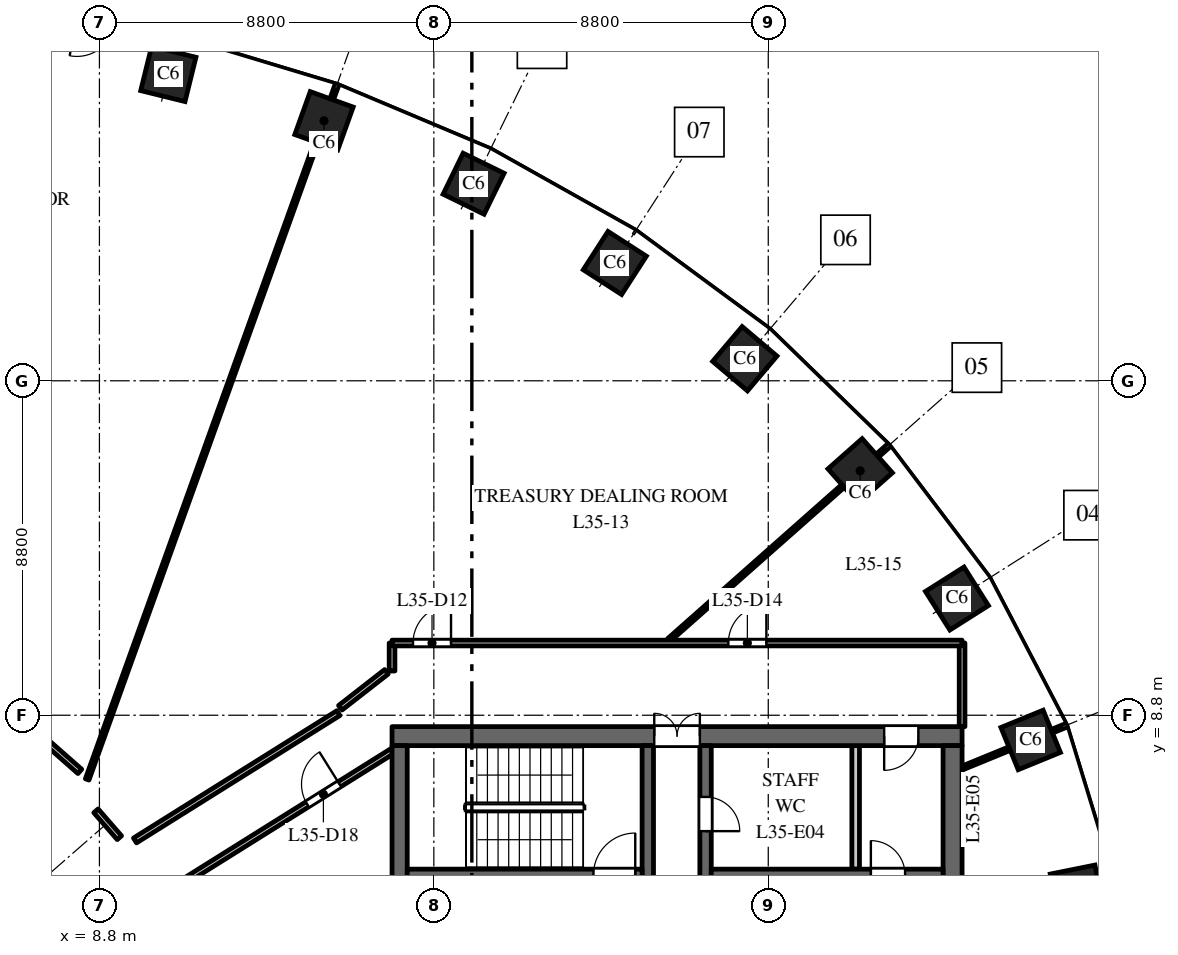
"""IFC4 building model, lengths in metres.
Left out: names, types, materials, properties, quantities, classifications, styles, units other than length and angle.
Written with IfcOpenShell. Run it as: python <this file> out.ifc"""

import sys

from ifc_helpers import new_model, si_unit, direction, frame, frame_2d, origin, origin_2d, place, context, subcontext, project, spatial, rectangle, extrude, element, fill, save


model = new_model("IFC4")
c1 = context("Model", 3, precision=1e-05, world=origin(), true_north=direction((0.0, 1.0)))
c2 = subcontext(c1, "Body", "Model", "MODEL_VIEW")
j1 = project(units=[si_unit("LENGTHUNIT", "METRE"), si_unit("PLANEANGLEUNIT", "RADIAN")], contexts=[c1])
p1 = place(None, origin())
s1 = spatial("IfcSite", under=j1, at=p1, CompositionType="ELEMENT")
p2 = place(p1, origin())
s2 = spatial("IfcBuilding", under=s1, at=p2, CompositionType="ELEMENT")
p3 = place(p2, frame((0.0, 0.0, 154.0)))
s3 = spatial("IfcBuildingStorey", under=s2, at=p3, CompositionType="ELEMENT", Elevation=154.0)
for number, where, z_axis, x_axis in (
    (1, (34.527, 4.151, 0.0), (0.0, 0.0, 1.0), (-0.197, 0.98, 0.0)),
    (2, (33.305, 8.149, 0.0), (0.0, 0.0, 1.0), (-0.379, 0.925, 0.0)),
    (3, (31.365, 11.871, 0.0), (0.0, 0.0, 1.0), (-0.535, 0.845, 0.0)),
    (4, (28.819, 15.23, 0.0), (0.0, 0.0, 1.0), (-0.663, 0.749, 0.0)),
    (5, (25.783, 18.18, 0.0), (0.0, 0.0, 1.0), (-0.763, 0.646, 0.0)),
    (6, (22.362, 20.7, 0.0), (0.0, 0.0, 1.0), (-0.84, 0.542, 0.0)),
    (7, (18.646, 22.785, 0.0), (0.0, 0.0, 1.0), (-0.898, 0.439, 0.0)),
    (8, (14.709, 24.441, 0.0), (0.0, 0.0, 1.0), (-0.941, 0.338, 0.0)),
    (9, (10.613, 25.674, 0.0), (0.0, 0.0, 1.0), (-0.971, 0.24, 0.0)),
):
    element("IfcColumn", number, at=place(p3, frame(where, z_axis=z_axis, x_axis=x_axis)), inside=s3, PredefinedType="COLUMN", context=c2, shape_type="SweptSolid", body=[
        extrude(rectangle(XDim=1.2, YDim=1.2, at=origin_2d()), origin(), (0.0, 0.0, 1.0), 4.0),
    ])
p4 = place(p3, frame((16.5, 8.25, 0.0), z_axis=(0.0, 0.0, 1.0), x_axis=(1.0, 0.0, 0.0)))
e10 = element("IfcWall", 10, at=p4, inside=s3, PredefinedType="SHEAR", context=c2, shape_type="SweptSolid", body=[
    extrude(rectangle(XDim=15.0, YDim=0.5, at=frame_2d((7.5, 0.0))), origin(), (0.0, 0.0, 1.0), 3.7),
])
p5 = place(p4, frame((6.9, 0.0, 0.0)))
e11 = element("IfcOpeningElement", 11, at=p5, cuts=e10, PredefinedType="OPENING", context=c2, shape_type="SweptSolid", body=[
    extrude(rectangle(XDim=1.2, YDim=2.1, at=frame_2d((0.6, 1.05))), frame((0.0, 0.26, 0.0), z_axis=(0.0, -1.0, 0.0), x_axis=(1.0, 0.0, 0.0)), (0.0, 0.0, 1.0), 0.52),
])
p6 = place(p4, frame((12.95, 0.0, 0.0)))
e12 = element("IfcOpeningElement", 12, at=p6, cuts=e10, PredefinedType="OPENING", context=c2, shape_type="SweptSolid", body=[
    extrude(rectangle(XDim=0.9, YDim=2.1, at=frame_2d((0.45, 1.05))), frame((0.0, 0.26, 0.0), z_axis=(0.0, -1.0, 0.0), x_axis=(1.0, 0.0, 0.0)), (0.0, 0.0, 1.0), 0.52),
])
p7 = place(p3, frame((24.75, -8.0, 0.0), z_axis=(0.0, 0.0, 1.0), x_axis=(0.0, 1.0, 0.0)))
e13 = element("IfcWall", 13, at=p7, inside=s3, PredefinedType="SHEAR", context=c2, shape_type="SweptSolid", body=[
    extrude(rectangle(XDim=16.0, YDim=0.3, at=frame_2d((8.0, 0.0))), origin(), (0.0, 0.0, 1.0), 3.7),
])
p8 = place(p7, frame((4.425, 0.0, 0.0)))
e14 = element("IfcOpeningElement", 14, at=p8, cuts=e13, PredefinedType="OPENING", context=c2, shape_type="SweptSolid", body=[
    extrude(rectangle(XDim=1.1, YDim=2.1, at=frame_2d((0.55, 1.05))), frame((0.0, 0.16, 0.0), z_axis=(0.0, -1.0, 0.0), x_axis=(1.0, 0.0, 0.0)), (0.0, 0.0, 1.0), 0.32),
])
p9 = place(p7, frame((7.45, 0.0, 0.0)))
e15 = element("IfcOpeningElement", 15, at=p9, cuts=e13, PredefinedType="OPENING", context=c2, shape_type="SweptSolid", body=[
    extrude(rectangle(XDim=1.1, YDim=2.1, at=frame_2d((0.55, 1.05))), frame((0.0, 0.16, 0.0), z_axis=(0.0, -1.0, 0.0), x_axis=(1.0, 0.0, 0.0)), (0.0, 0.0, 1.0), 0.32),
])
p10 = place(p7, frame((10.475, 0.0, 0.0)))
e16 = element("IfcOpeningElement", 16, at=p10, cuts=e13, PredefinedType="OPENING", context=c2, shape_type="SweptSolid", body=[
    extrude(rectangle(XDim=1.1, YDim=2.1, at=frame_2d((0.55, 1.05))), frame((0.0, 0.16, 0.0), z_axis=(0.0, -1.0, 0.0), x_axis=(1.0, 0.0, 0.0)), (0.0, 0.0, 1.0), 0.32),
])
p11 = place(p7, frame((13.75, 0.0, 0.0)))
e17 = element("IfcOpeningElement", 17, at=p11, cuts=e13, PredefinedType="OPENING", context=c2, shape_type="SweptSolid", body=[
    extrude(rectangle(XDim=0.9, YDim=2.1, at=frame_2d((0.45, 1.05))), frame((0.0, 0.16, 0.0), z_axis=(0.0, -1.0, 0.0), x_axis=(1.0, 0.0, 0.0)), (0.0, 0.0, 1.0), 0.32),
])
p12 = place(p7, frame((1.975, 0.0, 0.0)))
e18 = element("IfcOpeningElement", 18, at=p12, cuts=e13, PredefinedType="OPENING", context=c2, shape_type="SweptSolid", body=[
    extrude(rectangle(XDim=0.9, YDim=2.1, at=frame_2d((0.45, 1.05))), frame((0.0, 0.16, 0.0), z_axis=(0.0, -1.0, 0.0), x_axis=(1.0, 0.0, 0.0)), (0.0, 0.0, 1.0), 0.32),
])
p13 = place(p7, frame((0.35, 0.0, 0.0)))
e19 = element("IfcOpeningElement", 19, at=p13, cuts=e13, PredefinedType="OPENING", context=c2, shape_type="SweptSolid", body=[
    extrude(rectangle(XDim=0.9, YDim=2.1, at=frame_2d((0.45, 1.05))), frame((0.0, 0.16, 0.0), z_axis=(0.0, -1.0, 0.0), x_axis=(1.0, 0.0, 0.0)), (0.0, 0.0, 1.0), 0.32),
])
p14 = place(p3, frame((16.7, -8.0, 0.0), z_axis=(0.0, 0.0, 1.0), x_axis=(0.0, 1.0, 0.0)))
e20 = element("IfcWall", 20, at=p14, inside=s3, PredefinedType="SHEAR", context=c2, shape_type="SweptSolid", body=[
    extrude(rectangle(XDim=16.0, YDim=0.4, at=frame_2d((8.0, 0.0))), origin(), (0.0, 0.0, 1.0), 3.7),
])
p15 = place(p3, frame((31.25, -8.0, 0.0), z_axis=(0.0, 0.0, 1.0), x_axis=(0.0, 1.0, 0.0)))
e21 = element("IfcWall", 21, at=p15, inside=s3, PredefinedType="SHEAR", context=c2, shape_type="SweptSolid", body=[
    extrude(rectangle(XDim=16.0, YDim=0.5, at=frame_2d((8.0, 0.0))), origin(), (0.0, 0.0, 1.0), 3.7),
])
p16 = place(p3, frame((24.9, 4.6, 0.0), z_axis=(0.0, 0.0, 1.0), x_axis=(1.0, 0.0, 0.0)))
e22 = element("IfcWall", 22, at=p16, inside=s3, PredefinedType="SHEAR", context=c2, shape_type="SweptSolid", body=[
    extrude(rectangle(XDim=6.1, YDim=0.3, at=frame_2d((3.05, 0.0))), origin(), (0.0, 0.0, 1.0), 3.7),
])
p17 = place(p16, frame((4.2, 0.0, 0.0)))
e23 = element("IfcOpeningElement", 23, at=p17, cuts=e22, PredefinedType="OPENING", context=c2, shape_type="SweptSolid", body=[
    extrude(rectangle(XDim=0.9, YDim=2.1, at=frame_2d((0.45, 1.05))), frame((0.0, 0.16, 0.0), z_axis=(0.0, -1.0, 0.0), x_axis=(1.0, 0.0, 0.0)), (0.0, 0.0, 1.0), 0.32),
])
p18 = place(p3, frame((28.7, 4.75, 0.0), z_axis=(0.0, 0.0, 1.0), x_axis=(0.0, 1.0, 0.0)))
e24 = element("IfcWall", 24, at=p18, inside=s3, PredefinedType="PARTITIONING", context=c2, shape_type="SweptSolid", body=[
    extrude(rectangle(XDim=3.25, YDim=0.2, at=frame_2d((1.625, 0.0))), origin(), (0.0, 0.0, 1.0), 3.7),
])
p19 = place(p3, frame((23.23, 2.25, 0.0), z_axis=(0.0, 0.0, 1.0), x_axis=(0.0, 1.0, 0.0)))
e25 = element("IfcWall", 25, at=p19, inside=s3, PredefinedType="SHEAR", context=c2, shape_type="SweptSolid", body=[
    extrude(rectangle(XDim=5.75, YDim=0.3, at=frame_2d((2.875, 0.0))), origin(), (0.0, 0.0, 1.0), 3.7),
])
p20 = place(p19, frame((0.6, 0.0, 0.0)))
e26 = element("IfcOpeningElement", 26, at=p20, cuts=e25, PredefinedType="OPENING", context=c2, shape_type="SweptSolid", body=[
    extrude(rectangle(XDim=1.0, YDim=2.1, at=frame_2d((0.5, 1.05))), frame((0.0, 0.16, 0.0), z_axis=(0.0, -1.0, 0.0), x_axis=(1.0, 0.0, 0.0)), (0.0, 0.0, 1.0), 0.32),
])
p21 = place(p3, frame((16.9, 4.6, 0.0), z_axis=(0.0, 0.0, 1.0), x_axis=(1.0, 0.0, 0.0)))
e27 = element("IfcWall", 27, at=p21, inside=s3, PredefinedType="SHEAR", context=c2, shape_type="SweptSolid", body=[
    extrude(rectangle(XDim=6.18, YDim=0.3, at=frame_2d((3.09, 0.0))), origin(), (0.0, 0.0, 1.0), 3.7),
])
p22 = place(p21, frame((4.9, 0.0, 0.0)))
e28 = element("IfcOpeningElement", 28, at=p22, cuts=e27, PredefinedType="OPENING", context=c2, shape_type="SweptSolid", body=[
    extrude(rectangle(XDim=1.1, YDim=2.1, at=frame_2d((0.55, 1.05))), frame((0.0, 0.16, 0.0), z_axis=(0.0, -1.0, 0.0), x_axis=(1.0, 0.0, 0.0)), (0.0, 0.0, 1.0), 0.32),
])
p23 = place(p3, frame((7.458, 8.049, 0.0), z_axis=(0.0, 0.0, 1.0), x_axis=(0.75060787095, -0.660747927782, 0.0)))
e29 = element("IfcWall", 29, at=p23, inside=s3, PredefinedType="PARTITIONING", context=c2, shape_type="SweptSolid", body=[
    extrude(rectangle(XDim=1.1, YDim=0.15, at=frame_2d((0.55, 0.0))), origin(), (0.0, 0.0, 1.0), 3.7),
])
p24 = place(p3, frame((8.478, 7.111, 0.0), z_axis=(0.0, 0.0, 1.0), x_axis=(0.338361922043, 0.941016051782, 0.0)))
e30 = element("IfcWall", 30, at=p24, inside=s3, PredefinedType="PARTITIONING", context=c2, shape_type="SweptSolid", body=[
    extrude(rectangle(XDim=19.417, YDim=0.1, at=frame_2d((9.708, 0.0))), origin(), (0.0, 0.0, 1.0), 2.85),
])
p25 = place(p3, frame((8.709, 6.285, 0.0), z_axis=(0.0, 0.0, 1.0), x_axis=(0.656365478363, -0.754443078578, 0.0)))
e31 = element("IfcWall", 31, at=p25, inside=s3, PredefinedType="PARTITIONING", context=c2, shape_type="SweptSolid", body=[
    extrude(rectangle(XDim=0.938, YDim=0.15, at=frame_2d((0.469, 0.0))), origin(), (0.0, 0.0, 1.0), 3.7),
])
p26 = place(p3, frame((9.736, 5.505, 0.0), z_axis=(0.0, 0.0, 1.0), x_axis=(0.847611500167, 0.53061732424, 0.0)))
e32 = element("IfcWall", 32, at=p26, inside=s3, PredefinedType="PARTITIONING", context=c2, shape_type="SweptSolid", body=[
    extrude(rectangle(XDim=6.315, YDim=0.15, at=frame_2d((3.158, 0.0))), origin(), (0.0, 0.0, 1.0), 3.7),
])
p27 = place(p3, frame((10.752, 4.254, 0.0), z_axis=(0.0, 0.0, 1.0), x_axis=(0.847690706888, 0.530490777917, 0.0)))
e33 = element("IfcWall", 33, at=p27, inside=s3, PredefinedType="PARTITIONING", context=c2, shape_type="SweptSolid", body=[
    extrude(rectangle(XDim=6.781, YDim=0.15, at=frame_2d((3.39, 0.0))), origin(), (0.0, 0.0, 1.0), 3.7),
])
p28 = place(p27, frame((4.15, 0.0, 0.0)))
e34 = element("IfcOpeningElement", 34, at=p28, cuts=e33, PredefinedType="OPENING", context=c2, shape_type="SweptSolid", body=[
    extrude(rectangle(XDim=1.0, YDim=2.1, at=frame_2d((0.5, 1.05))), frame((0.0, 0.085, 0.0), z_axis=(0.0, -1.0, 0.0), x_axis=(1.0, 0.0, 0.0)), (0.0, 0.0, 1.0), 0.17),
])
p29 = place(p3, frame((16.5, 9.964, 0.0), z_axis=(0.0, 0.0, 1.0), x_axis=(0.0, 1.0, 0.0)))
e35 = element("IfcWall", 35, at=p29, inside=s3, PredefinedType="PARTITIONING", context=c2, shape_type="SweptSolid", body=[
    extrude(rectangle(XDim=0.736, YDim=0.15, at=frame_2d((0.368, 0.0))), origin(), (0.0, 0.0, 1.0), 3.7),
])
p30 = place(p3, frame((16.5, 10.7, 0.0), z_axis=(0.0, 0.0, 1.0), x_axis=(1.0, 0.0, 0.0)))
e36 = element("IfcWall", 36, at=p30, inside=s3, PredefinedType="PARTITIONING", context=c2, shape_type="SweptSolid", body=[
    extrude(rectangle(XDim=15.0, YDim=0.15, at=frame_2d((7.5, 0.0))), origin(), (0.0, 0.0, 1.0), 2.75),
])
p31 = place(p30, frame((0.552, 0.0, 0.0)))
e37 = element("IfcOpeningElement", 37, at=p31, cuts=e36, PredefinedType="OPENING", context=c2, shape_type="SweptSolid", body=[
    extrude(rectangle(XDim=1.0, YDim=2.1, at=frame_2d((0.5, 1.05))), frame((0.0, 0.085, 0.0), z_axis=(0.0, -1.0, 0.0), x_axis=(1.0, 0.0, 0.0)), (0.0, 0.0, 1.0), 0.17),
])
p32 = place(p30, frame((8.85, 0.0, 0.0)))
e38 = element("IfcOpeningElement", 38, at=p32, cuts=e36, PredefinedType="OPENING", context=c2, shape_type="SweptSolid", body=[
    extrude(rectangle(XDim=1.0, YDim=2.1, at=frame_2d((0.5, 1.05))), frame((0.0, 0.085, 0.0), z_axis=(0.0, -1.0, 0.0), x_axis=(1.0, 0.0, 0.0)), (0.0, 0.0, 1.0), 0.17),
])
p33 = place(p3, frame((23.785, 10.778, 0.0), z_axis=(0.0, 0.0, 1.0), x_axis=(0.748985701008, 0.662586160198, 0.0)))
e39 = element("IfcWall", 39, at=p33, inside=s3, PredefinedType="PARTITIONING", context=c2, shape_type="SweptSolid", body=[
    extrude(rectangle(XDim=7.723, YDim=0.1, at=frame_2d((3.861, 0.0))), origin(), (0.0, 0.0, 1.0), 3.7),
])
p34 = place(p3, frame((31.5, 7.41, 0.0), z_axis=(0.0, 0.0, 1.0), x_axis=(0.925344112436, 0.379128307542, 0.0)))
e40 = element("IfcWall", 40, at=p34, inside=s3, PredefinedType="PARTITIONING", context=c2, shape_type="SweptSolid", body=[
    extrude(rectangle(XDim=2.954, YDim=0.1, at=frame_2d((1.477, 0.0))), origin(), (0.0, 0.0, 1.0), 3.7),
])
p35 = place(p3, frame((31.5, 8.5, 0.0), z_axis=(0.0, 0.0, 1.0), x_axis=(0.0, 1.0, 0.0)))
e41 = element("IfcWall", 41, at=p35, inside=s3, PredefinedType="PARTITIONING", context=c2, shape_type="SweptSolid", body=[
    extrude(rectangle(XDim=2.2, YDim=0.15, at=frame_2d((1.1, 0.0))), origin(), (0.0, 0.0, 1.0), 2.9),
])
p36 = place(p3, frame((15.139, 8.997, 0.0), z_axis=(0.0, 0.0, 1.0), x_axis=(0.788950226826, 0.614457109643, 0.0)))
e42 = element("IfcWall", 42, at=p36, inside=s3, PredefinedType="PARTITIONING", context=c2, shape_type="SweptSolid", body=[
    extrude(rectangle(XDim=1.538, YDim=0.15, at=frame_2d((0.769, 0.0))), origin(), (0.0, 0.0, 1.0), 3.7),
])
p37 = place(p22, origin())
e43 = element("IfcDoor", 43, at=p37, inside=s3, OperationType="SINGLE_SWING_LEFT", PredefinedType="DOOR", context=c2, shape_type="SweptSolid", body=[
    extrude(rectangle(XDim=1.1, YDim=2.1, at=frame_2d((0.55, 1.05))), frame((0.0, 0.025, 0.0), z_axis=(0.0, -1.0, 0.0), x_axis=(1.0, 0.0, 0.0)), (0.0, 0.0, 1.0), 0.05),
])
fill(e28, e43)
p38 = place(p5, origin())
e44 = element("IfcDoor", 44, at=p38, inside=s3, OperationType="DOUBLE_DOOR_DOUBLE_SWING", PredefinedType="DOOR", context=c2, shape_type="SweptSolid", body=[
    extrude(rectangle(XDim=1.2, YDim=2.1, at=frame_2d((0.6, 1.05))), frame((0.0, 0.025, 0.0), z_axis=(0.0, -1.0, 0.0), x_axis=(1.0, 0.0, 0.0)), (0.0, 0.0, 1.0), 0.05),
])
fill(e11, e44)
p39 = place(p11, origin())
e45 = element("IfcDoor", 45, at=p39, inside=s3, OperationType="SINGLE_SWING_LEFT", PredefinedType="DOOR", context=c2, shape_type="SweptSolid", body=[
    extrude(rectangle(XDim=0.9, YDim=2.1, at=frame_2d((0.45, 1.05))), frame((0.0, 0.025, 0.0), z_axis=(0.0, -1.0, 0.0), x_axis=(1.0, 0.0, 0.0)), (0.0, 0.0, 1.0), 0.05),
])
fill(e17, e45)
p40 = place(p6, origin())
e46 = element("IfcDoor", 46, at=p40, inside=s3, OperationType="SINGLE_SWING_LEFT", PredefinedType="DOOR", context=c2, shape_type="SweptSolid", body=[
    extrude(rectangle(XDim=0.9, YDim=2.1, at=frame_2d((0.45, 1.05))), frame((0.0, 0.025, 0.0), z_axis=(0.0, -1.0, 0.0), x_axis=(1.0, 0.0, 0.0)), (0.0, 0.0, 1.0), 0.05),
])
fill(e12, e46)
p41 = place(p17, origin())
e47 = element("IfcDoor", 47, at=p41, inside=s3, OperationType="SINGLE_SWING_RIGHT", PredefinedType="DOOR", context=c2, shape_type="SweptSolid", body=[
    extrude(rectangle(XDim=0.9, YDim=2.1, at=frame_2d((0.45, 1.05))), frame((0.0, 0.025, 0.0), z_axis=(0.0, -1.0, 0.0), x_axis=(1.0, 0.0, 0.0)), (0.0, 0.0, 1.0), 0.05),
])
fill(e23, e47)
p42 = place(p31, origin())
e48 = element("IfcDoor", 48, at=p42, inside=s3, OperationType="SINGLE_SWING_RIGHT", PredefinedType="DOOR", context=c2, shape_type="SweptSolid", body=[
    extrude(rectangle(XDim=1.0, YDim=2.1, at=frame_2d((0.5, 1.05))), frame((0.0, 0.025, 0.0), z_axis=(0.0, -1.0, 0.0), x_axis=(1.0, 0.0, 0.0)), (0.0, 0.0, 1.0), 0.05),
])
fill(e37, e48)
p43 = place(p32, origin())
e49 = element("IfcDoor", 49, at=p43, inside=s3, OperationType="SINGLE_SWING_RIGHT", PredefinedType="DOOR", context=c2, shape_type="SweptSolid", body=[
    extrude(rectangle(XDim=1.0, YDim=2.1, at=frame_2d((0.5, 1.05))), frame((0.0, 0.025, 0.0), z_axis=(0.0, -1.0, 0.0), x_axis=(1.0, 0.0, 0.0)), (0.0, 0.0, 1.0), 0.05),
])
fill(e38, e49)
p44 = place(p28, origin())
e50 = element("IfcDoor", 50, at=p44, inside=s3, OperationType="SINGLE_SWING_RIGHT", PredefinedType="DOOR", context=c2, shape_type="SweptSolid", body=[
    extrude(rectangle(XDim=1.0, YDim=2.1, at=frame_2d((0.5, 1.05))), frame((0.0, 0.025, 0.0), z_axis=(0.0, -1.0, 0.0), x_axis=(1.0, 0.0, 0.0)), (0.0, 0.0, 1.0), 0.05),
])
fill(e34, e50)
save(model, sys.argv[1])
